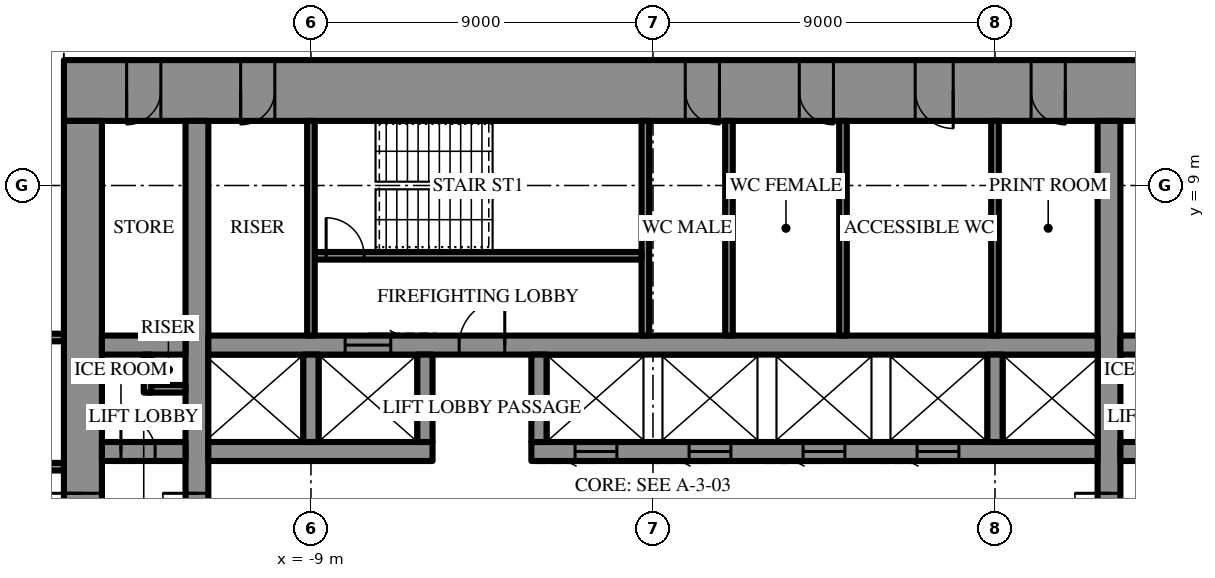
"""IFC4 building model, lengths in metres.
Left out: names, types, materials, properties, quantities, classifications, styles, units other than length and angle.
Written with IfcOpenShell. Run it as: python <this file> out.ifc"""

import sys

from ifc_helpers import new_model, si_unit, direction, frame, frame_2d, origin, place, context, subcontext, project, spatial, rectangle, extrude, element, fill, save


model = new_model("IFC4")
c1 = context("Model", 3, precision=1e-05, world=origin(), true_north=direction((0.0, 1.0)))
c2 = subcontext(c1, "Body", "Model", "MODEL_VIEW")
j1 = project(units=[si_unit("LENGTHUNIT", "METRE"), si_unit("PLANEANGLEUNIT", "RADIAN")], contexts=[c1])
p1 = place(None, origin())
s1 = spatial("IfcSite", under=j1, at=p1, CompositionType="ELEMENT")
p2 = place(p1, origin())
s2 = spatial("IfcBuilding", under=s1, at=p2, CompositionType="ELEMENT")
p3 = place(p2, frame((0.0, 0.0, 236.5)))
s3 = spatial("IfcBuildingStorey", under=s2, at=p3, CompositionType="ELEMENT", Elevation=236.5)
p4 = place(p3, frame((-15.5, 11.5, 0.0), z_axis=(0.0, 0.0, 1.0), x_axis=(1.0, 0.0, 0.0)))
e1 = element("IfcWall", 1, at=p4, inside=s3, PredefinedType="SHEAR", context=c2, shape_type="SweptSolid", body=[
    extrude(rectangle(XDim=31.0, YDim=1.6, at=frame_2d((15.5, 0.0))), origin(), (0.0, 0.0, 1.0), 4.2),
])
p5 = place(p4, frame((16.35, 0.0, 0.0)))
e2 = element("IfcOpeningElement", 2, at=p5, cuts=e1, PredefinedType="OPENING", context=c2, shape_type="SweptSolid", body=[
    extrude(rectangle(XDim=0.9, YDim=2.2, at=frame_2d((0.45, 1.1))), frame((0.0, 0.81, 0.0), z_axis=(0.0, -1.0, 0.0), x_axis=(1.0, 0.0, 0.0)), (0.0, 0.0, 1.0), 1.62),
])
p6 = place(p4, frame((19.35, 0.0, 0.0)))
e3 = element("IfcOpeningElement", 3, at=p6, cuts=e1, PredefinedType="OPENING", context=c2, shape_type="SweptSolid", body=[
    extrude(rectangle(XDim=0.9, YDim=2.2, at=frame_2d((0.45, 1.1))), frame((0.0, 0.81, 0.0), z_axis=(0.0, -1.0, 0.0), x_axis=(1.0, 0.0, 0.0)), (0.0, 0.0, 1.0), 1.62),
])
p7 = place(p4, frame((22.4, 0.0, 0.0)))
e4 = element("IfcOpeningElement", 4, at=p7, cuts=e1, PredefinedType="OPENING", context=c2, shape_type="SweptSolid", body=[
    extrude(rectangle(XDim=1.0, YDim=2.2, at=frame_2d((0.5, 1.1))), frame((0.0, 0.81, 0.0), z_axis=(0.0, -1.0, 0.0), x_axis=(1.0, 0.0, 0.0)), (0.0, 0.0, 1.0), 1.62),
])
p8 = place(p4, frame((1.65, 0.0, 0.0)))
e5 = element("IfcOpeningElement", 5, at=p8, cuts=e1, PredefinedType="OPENING", context=c2, shape_type="SweptSolid", body=[
    extrude(rectangle(XDim=0.9, YDim=2.2, at=frame_2d((0.45, 1.1))), frame((0.0, 0.81, 0.0), z_axis=(0.0, -1.0, 0.0), x_axis=(1.0, 0.0, 0.0)), (0.0, 0.0, 1.0), 1.62),
])
p9 = place(p4, frame((4.65, 0.0, 0.0)))
e6 = element("IfcOpeningElement", 6, at=p9, cuts=e1, PredefinedType="OPENING", context=c2, shape_type="SweptSolid", body=[
    extrude(rectangle(XDim=0.9, YDim=2.2, at=frame_2d((0.45, 1.1))), frame((0.0, 0.81, 0.0), z_axis=(0.0, -1.0, 0.0), x_axis=(1.0, 0.0, 0.0)), (0.0, 0.0, 1.0), 1.62),
])
p10 = place(p4, frame((25.45, 0.0, 0.0)))
e7 = element("IfcOpeningElement", 7, at=p10, cuts=e1, PredefinedType="OPENING", context=c2, shape_type="SweptSolid", body=[
    extrude(rectangle(XDim=0.9, YDim=2.2, at=frame_2d((0.45, 1.1))), frame((0.0, 0.81, 0.0), z_axis=(0.0, -1.0, 0.0), x_axis=(1.0, 0.0, 0.0)), (0.0, 0.0, 1.0), 1.62),
])
p11 = place(p4, frame((28.45, 0.0, 0.0)))
e8 = element("IfcOpeningElement", 8, at=p11, cuts=e1, PredefinedType="OPENING", context=c2, shape_type="SweptSolid", body=[
    extrude(rectangle(XDim=0.9, YDim=2.2, at=frame_2d((0.45, 1.1))), frame((0.0, 0.81, 0.0), z_axis=(0.0, -1.0, 0.0), x_axis=(1.0, 0.0, 0.0)), (0.0, 0.0, 1.0), 1.62),
])
p12 = place(p3, frame((-15.0, 10.7, 0.0), z_axis=(0.0, 0.0, 1.0), x_axis=(0.0, -1.0, 0.0)))
e9 = element("IfcWall", 9, at=p12, inside=s3, PredefinedType="SHEAR", context=c2, shape_type="SweptSolid", body=[
    extrude(rectangle(XDim=21.4, YDim=1.0, at=frame_2d((10.7, 0.0))), origin(), (0.0, 0.0, 1.0), 4.2),
])
p13 = place(p12, frame((9.8, 0.0, 0.0)))
e10 = element("IfcOpeningElement", 10, at=p13, cuts=e9, PredefinedType="OPENING", context=c2, shape_type="SweptSolid", body=[
    extrude(rectangle(XDim=1.8, YDim=2.4, at=frame_2d((0.9, 1.2))), frame((0.0, 0.51, 0.0), z_axis=(0.0, -1.0, 0.0), x_axis=(1.0, 0.0, 0.0)), (0.0, 0.0, 1.0), 1.02),
])
p14 = place(p3, frame((12.0, -10.7, 0.0), z_axis=(0.0, 0.0, 1.0), x_axis=(0.0, 1.0, 0.0)))
e11 = element("IfcWall", 11, at=p14, inside=s3, PredefinedType="SHEAR", context=c2, shape_type="SweptSolid", body=[
    extrude(rectangle(XDim=21.4, YDim=0.6, at=frame_2d((10.7, 0.0))), origin(), (0.0, 0.0, 1.0), 4.2),
])
p15 = place(p14, frame((9.8, 0.0, 0.0)))
e12 = element("IfcOpeningElement", 12, at=p15, cuts=e11, PredefinedType="OPENING", context=c2, shape_type="SweptSolid", body=[
    extrude(rectangle(XDim=1.8, YDim=2.4, at=frame_2d((0.9, 1.2))), frame((0.0, 0.31, 0.0), z_axis=(0.0, -1.0, 0.0), x_axis=(1.0, 0.0, 0.0)), (0.0, 0.0, 1.0), 0.62),
])
p16 = place(p3, frame((-12.0, -10.7, 0.0), z_axis=(0.0, 0.0, 1.0), x_axis=(0.0, 1.0, 0.0)))
e13 = element("IfcWall", 13, at=p16, inside=s3, PredefinedType="SHEAR", context=c2, shape_type="SweptSolid", body=[
    extrude(rectangle(XDim=21.4, YDim=0.6, at=frame_2d((10.7, 0.0))), origin(), (0.0, 0.0, 1.0), 4.2),
])
p17 = place(p16, frame((9.8, 0.0, 0.0)))
e14 = element("IfcOpeningElement", 14, at=p17, cuts=e13, PredefinedType="OPENING", context=c2, shape_type="SweptSolid", body=[
    extrude(rectangle(XDim=1.8, YDim=2.4, at=frame_2d((0.9, 1.2))), frame((0.0, 0.31, 0.0), z_axis=(0.0, -1.0, 0.0), x_axis=(1.0, 0.0, 0.0)), (0.0, 0.0, 1.0), 0.62),
])
p18 = place(p3, frame((-14.5, 2.0, 0.0), z_axis=(0.0, 0.0, 1.0), x_axis=(1.0, 0.0, 0.0)))
e15 = element("IfcWall", 15, at=p18, inside=s3, PredefinedType="SHEAR", context=c2, shape_type="SweptSolid", body=[
    extrude(rectangle(XDim=2.2, YDim=0.5, at=frame_2d((1.1, 0.0))), origin(), (0.0, 0.0, 1.0), 4.2),
])
p19 = place(p18, frame((0.5, 0.0, 0.0)))
e16 = element("IfcOpeningElement", 16, at=p19, cuts=e15, PredefinedType="OPENING", context=c2, shape_type="SweptSolid", body=[
    extrude(rectangle(XDim=0.9, YDim=2.2, at=frame_2d((0.45, 1.1))), frame((0.0, 0.26, 0.0), z_axis=(0.0, -1.0, 0.0), x_axis=(1.0, 0.0, 0.0)), (0.0, 0.0, 1.0), 0.52),
])
p20 = place(p3, frame((-11.7, 2.0, 0.0), z_axis=(0.0, 0.0, 1.0), x_axis=(1.0, 0.0, 0.0)))
e17 = element("IfcWall", 17, at=p20, inside=s3, PredefinedType="SHEAR", context=c2, shape_type="SweptSolid", body=[
    extrude(rectangle(XDim=5.9, YDim=0.5, at=frame_2d((2.95, 0.0))), origin(), (0.0, 0.0, 1.0), 4.2),
])
p21 = place(p3, frame((-3.2, 2.0, 0.0), z_axis=(0.0, 0.0, 1.0), x_axis=(1.0, 0.0, 0.0)))
e18 = element("IfcWall", 18, at=p21, inside=s3, PredefinedType="SHEAR", context=c2, shape_type="SweptSolid", body=[
    extrude(rectangle(XDim=14.9, YDim=0.5, at=frame_2d((7.45, 0.0))), origin(), (0.0, 0.0, 1.0), 4.2),
])
p22 = place(p21, frame((1.15, 0.0, 0.0)))
e19 = element("IfcOpeningElement", 19, at=p22, cuts=e18, PredefinedType="OPENING", context=c2, shape_type="SweptSolid", body=[
    extrude(rectangle(XDim=1.1, YDim=2.2, at=frame_2d((0.55, 1.1))), frame((0.0, 0.26, 0.0), z_axis=(0.0, -1.0, 0.0), x_axis=(1.0, 0.0, 0.0)), (0.0, 0.0, 1.0), 0.52),
])
p23 = place(p21, frame((4.15, 0.0, 0.0)))
e20 = element("IfcOpeningElement", 20, at=p23, cuts=e18, PredefinedType="OPENING", context=c2, shape_type="SweptSolid", body=[
    extrude(rectangle(XDim=1.1, YDim=2.2, at=frame_2d((0.55, 1.1))), frame((0.0, 0.26, 0.0), z_axis=(0.0, -1.0, 0.0), x_axis=(1.0, 0.0, 0.0)), (0.0, 0.0, 1.0), 0.52),
])
p24 = place(p21, frame((7.15, 0.0, 0.0)))
e21 = element("IfcOpeningElement", 21, at=p24, cuts=e18, PredefinedType="OPENING", context=c2, shape_type="SweptSolid", body=[
    extrude(rectangle(XDim=1.1, YDim=2.2, at=frame_2d((0.55, 1.1))), frame((0.0, 0.26, 0.0), z_axis=(0.0, -1.0, 0.0), x_axis=(1.0, 0.0, 0.0)), (0.0, 0.0, 1.0), 0.52),
])
p25 = place(p21, frame((10.15, 0.0, 0.0)))
e22 = element("IfcOpeningElement", 22, at=p25, cuts=e18, PredefinedType="OPENING", context=c2, shape_type="SweptSolid", body=[
    extrude(rectangle(XDim=1.1, YDim=2.2, at=frame_2d((0.55, 1.1))), frame((0.0, 0.26, 0.0), z_axis=(0.0, -1.0, 0.0), x_axis=(1.0, 0.0, 0.0)), (0.0, 0.0, 1.0), 0.52),
])
p26 = place(p3, frame((12.3, 2.0, 0.0), z_axis=(0.0, 0.0, 1.0), x_axis=(1.0, 0.0, 0.0)))
e23 = element("IfcWall", 23, at=p26, inside=s3, PredefinedType="SHEAR", context=c2, shape_type="SweptSolid", body=[
    extrude(rectangle(XDim=2.2, YDim=0.5, at=frame_2d((1.1, 0.0))), origin(), (0.0, 0.0, 1.0), 4.2),
])
p27 = place(p26, frame((0.8, 0.0, 0.0)))
e24 = element("IfcOpeningElement", 24, at=p27, cuts=e23, PredefinedType="OPENING", context=c2, shape_type="SweptSolid", body=[
    extrude(rectangle(XDim=0.9, YDim=2.2, at=frame_2d((0.45, 1.1))), frame((0.0, 0.26, 0.0), z_axis=(0.0, -1.0, 0.0), x_axis=(1.0, 0.0, 0.0)), (0.0, 0.0, 1.0), 0.52),
])
p28 = place(p3, frame((-14.5, 4.8, 0.0), z_axis=(0.0, 0.0, 1.0), x_axis=(1.0, 0.0, 0.0)))
e25 = element("IfcWall", 25, at=p28, inside=s3, PredefinedType="SHEAR", context=c2, shape_type="SweptSolid", body=[
    extrude(rectangle(XDim=2.2, YDim=0.5, at=frame_2d((1.1, 0.0))), origin(), (0.0, 0.0, 1.0), 4.2),
])
p29 = place(p3, frame((-11.7, 4.8, 0.0), z_axis=(0.0, 0.0, 1.0), x_axis=(1.0, 0.0, 0.0)))
e26 = element("IfcWall", 26, at=p29, inside=s3, PredefinedType="SHEAR", context=c2, shape_type="SweptSolid", body=[
    extrude(rectangle(XDim=23.4, YDim=0.5, at=frame_2d((11.7, 0.0))), origin(), (0.0, 0.0, 1.0), 4.2),
])
p30 = place(p29, frame((6.6, 0.0, 0.0)))
e27 = element("IfcOpeningElement", 27, at=p30, cuts=e26, PredefinedType="OPENING", context=c2, shape_type="SweptSolid", body=[
    extrude(rectangle(XDim=1.2, YDim=2.2, at=frame_2d((0.6, 1.1))), frame((0.0, 0.26, 0.0), z_axis=(0.0, -1.0, 0.0), x_axis=(1.0, 0.0, 0.0)), (0.0, 0.0, 1.0), 0.52),
])
p31 = place(p29, frame((3.6, 0.0, 0.0)))
e28 = element("IfcOpeningElement", 28, at=p31, cuts=e26, PredefinedType="OPENING", context=c2, shape_type="SweptSolid", body=[
    extrude(rectangle(XDim=1.2, YDim=2.2, at=frame_2d((0.6, 1.1))), frame((0.0, 0.26, 0.0), z_axis=(0.0, -1.0, 0.0), x_axis=(1.0, 0.0, 0.0)), (0.0, 0.0, 1.0), 0.52),
])
p32 = place(p3, frame((12.3, 4.8, 0.0), z_axis=(0.0, 0.0, 1.0), x_axis=(1.0, 0.0, 0.0)))
e29 = element("IfcWall", 29, at=p32, inside=s3, PredefinedType="SHEAR", context=c2, shape_type="SweptSolid", body=[
    extrude(rectangle(XDim=2.2, YDim=0.5, at=frame_2d((1.1, 0.0))), origin(), (0.0, 0.0, 1.0), 4.2),
])
for number, where, z_axis, x_axis in (
    (30, (-9.0, 2.25, 0.0), (0.0, 0.0, 1.0), (0.0, 1.0, 0.0)),
    (31, (-6.0, 2.25, 0.0), (0.0, 0.0, 1.0), (0.0, 1.0, 0.0)),
    (32, (-3.0, 2.25, 0.0), (0.0, 0.0, 1.0), (0.0, 1.0, 0.0)),
    (33, (9.0, 2.25, 0.0), (0.0, 0.0, 1.0), (0.0, 1.0, 0.0)),
):
    element("IfcWall", number, at=place(p3, frame(where, z_axis=z_axis, x_axis=x_axis)), inside=s3, PredefinedType="SHEAR", context=c2, shape_type="SweptSolid", body=[
        extrude(rectangle(XDim=2.3, YDim=0.4, at=frame_2d((1.15, 0.0))), origin(), (0.0, 0.0, 1.0), 4.2),
    ])
p33 = place(p3, frame((-0.2, 5.05, 0.0), z_axis=(0.0, 0.0, 1.0), x_axis=(0.0, 1.0, 0.0)))
e34 = element("IfcWall", 34, at=p33, inside=s3, PredefinedType="SHEAR", context=c2, shape_type="SweptSolid", body=[
    extrude(rectangle(XDim=5.65, YDim=0.2, at=frame_2d((2.825, 0.0))), origin(), (0.0, 0.0, 1.0), 4.2),
])
p34 = place(p3, frame((-8.9, 7.15, 0.0), z_axis=(0.0, 0.0, 1.0), x_axis=(1.0, 0.0, 0.0)))
e35 = element("IfcWall", 35, at=p34, inside=s3, PredefinedType="SHEAR", context=c2, shape_type="SweptSolid", body=[
    extrude(rectangle(XDim=8.6, YDim=0.2, at=frame_2d((4.3, 0.0))), origin(), (0.0, 0.0, 1.0), 4.2),
])
p35 = place(p34, frame((0.3, 0.0, 0.0)))
e36 = element("IfcOpeningElement", 36, at=p35, cuts=e35, PredefinedType="OPENING", context=c2, shape_type="SweptSolid", body=[
    extrude(rectangle(XDim=1.0, YDim=2.2, at=frame_2d((0.5, 1.1))), frame((0.0, 0.11, 0.0), z_axis=(0.0, -1.0, 0.0), x_axis=(1.0, 0.0, 0.0)), (0.0, 0.0, 1.0), 0.22),
])
for number, where, z_axis, x_axis in (
    (37, (-9.0, 5.05, 0.0), (0.0, 0.0, 1.0), (0.0, 1.0, 0.0)),
    (38, (9.0, 5.05, 0.0), (0.0, 0.0, 1.0), (0.0, 1.0, 0.0)),
    (39, (2.0, 5.05, 0.0), (0.0, 0.0, 1.0), (0.0, 1.0, 0.0)),
    (40, (5.0, 5.05, 0.0), (0.0, 0.0, 1.0), (0.0, 1.0, 0.0)),
):
    element("IfcWall", number, at=place(p3, frame(where, z_axis=z_axis, x_axis=x_axis)), inside=s3, PredefinedType="PARTITIONING", context=c2, shape_type="SweptSolid", body=[
        extrude(rectangle(XDim=5.65, YDim=0.2, at=frame_2d((2.825, 0.0))), origin(), (0.0, 0.0, 1.0), 4.0),
    ])
for number, where, z_axis, x_axis in (
    (41, (-13.3, 3.65, 0.0), (0.0, 0.0, 1.0), (1.0, 0.0, 0.0)),
    (42, (-13.3, 3.55, 0.0), (0.0, 0.0, 1.0), (0.0, 1.0, 0.0)),
):
    element("IfcWall", number, at=place(p3, frame(where, z_axis=z_axis, x_axis=x_axis)), inside=s3, PredefinedType="PARTITIONING", context=c2, shape_type="SweptSolid", body=[
        extrude(rectangle(XDim=1.0, YDim=0.2, at=frame_2d((0.5, 0.0))), origin(), (0.0, 0.0, 1.0), 4.0),
    ])
p36 = place(p3, frame((-15.5, 1.6, 0.0), z_axis=(0.0, 0.0, 1.0), x_axis=(-1.0, 0.0, 0.0)))
e43 = element("IfcWall", 43, at=p36, inside=s3, PredefinedType="PARTITIONING", context=c2, shape_type="SweptSolid", body=[
    extrude(rectangle(XDim=9.7, YDim=0.2, at=frame_2d((4.85, 0.0))), origin(), (0.0, 0.0, 1.0), 4.0),
])
p37 = place(p36, frame((6.29, 0.0, 0.0)))
e44 = element("IfcOpeningElement", 44, at=p37, cuts=e43, PredefinedType="OPENING", context=c2, shape_type="SweptSolid", body=[
    extrude(rectangle(XDim=1.0, YDim=2.2, at=frame_2d((0.5, 1.1))), frame((0.0, 0.11, 0.0), z_axis=(0.0, -1.0, 0.0), x_axis=(1.0, 0.0, 0.0)), (0.0, 0.0, 1.0), 0.22),
])
p38 = place(p3, frame((-15.5, 5.0, 0.0), z_axis=(0.0, 0.0, 1.0), x_axis=(-1.0, 0.0, 0.0)))
e45 = element("IfcWall", 45, at=p38, inside=s3, PredefinedType="PARTITIONING", context=c2, shape_type="SweptSolid", body=[
    extrude(rectangle(XDim=14.845, YDim=0.2, at=frame_2d((7.423, 0.0))), origin(), (0.0, 0.0, 1.0), 4.0),
])
p39 = place(p13, frame((1.8, 0.0, 0.0), z_axis=(0.0, 0.0, 1.0), x_axis=(-1.0, 0.0, 0.0)))
e46 = element("IfcDoor", 46, at=p39, inside=s3, OperationType="DOUBLE_DOOR_SINGLE_SWING", PredefinedType="DOOR", context=c2, shape_type="SweptSolid", body=[
    extrude(rectangle(XDim=1.8, YDim=2.4, at=frame_2d((0.9, 1.2))), frame((0.0, 0.025, 0.0), z_axis=(0.0, -1.0, 0.0), x_axis=(1.0, 0.0, 0.0)), (0.0, 0.0, 1.0), 0.05),
])
fill(e10, e46)
p40 = place(p30, origin())
e47 = element("IfcDoor", 47, at=p40, inside=s3, OperationType="SINGLE_SWING_LEFT", PredefinedType="DOOR", context=c2, shape_type="SweptSolid", body=[
    extrude(rectangle(XDim=1.2, YDim=2.2, at=frame_2d((0.6, 1.1))), frame((0.0, 0.025, 0.0), z_axis=(0.0, -1.0, 0.0), x_axis=(1.0, 0.0, 0.0)), (0.0, 0.0, 1.0), 0.05),
])
fill(e27, e47)
p41 = place(p35, origin())
e48 = element("IfcDoor", 48, at=p41, inside=s3, OperationType="SINGLE_SWING_RIGHT", PredefinedType="DOOR", context=c2, shape_type="SweptSolid", body=[
    extrude(rectangle(XDim=1.0, YDim=2.2, at=frame_2d((0.5, 1.1))), frame((0.0, 0.025, 0.0), z_axis=(0.0, -1.0, 0.0), x_axis=(1.0, 0.0, 0.0)), (0.0, 0.0, 1.0), 0.05),
])
fill(e36, e48)
p42 = place(p5, frame((0.9, 0.0, 0.0), z_axis=(0.0, 0.0, 1.0), x_axis=(-1.0, 0.0, 0.0)))
e49 = element("IfcDoor", 49, at=p42, inside=s3, OperationType="SINGLE_SWING_RIGHT", PredefinedType="DOOR", context=c2, shape_type="SweptSolid", body=[
    extrude(rectangle(XDim=0.9, YDim=2.2, at=frame_2d((0.45, 1.1))), frame((0.0, 0.025, 0.0), z_axis=(0.0, -1.0, 0.0), x_axis=(1.0, 0.0, 0.0)), (0.0, 0.0, 1.0), 0.05),
])
fill(e2, e49)
p43 = place(p6, frame((0.9, 0.0, 0.0), z_axis=(0.0, 0.0, 1.0), x_axis=(-1.0, 0.0, 0.0)))
e50 = element("IfcDoor", 50, at=p43, inside=s3, OperationType="SINGLE_SWING_RIGHT", PredefinedType="DOOR", context=c2, shape_type="SweptSolid", body=[
    extrude(rectangle(XDim=0.9, YDim=2.2, at=frame_2d((0.45, 1.1))), frame((0.0, 0.025, 0.0), z_axis=(0.0, -1.0, 0.0), x_axis=(1.0, 0.0, 0.0)), (0.0, 0.0, 1.0), 0.05),
])
fill(e3, e50)
p44 = place(p7, frame((1.0, 0.0, 0.0), z_axis=(0.0, 0.0, 1.0), x_axis=(-1.0, 0.0, 0.0)))
e51 = element("IfcDoor", 51, at=p44, inside=s3, OperationType="SINGLE_SWING_RIGHT", PredefinedType="DOOR", context=c2, shape_type="SweptSolid", body=[
    extrude(rectangle(XDim=1.0, YDim=2.2, at=frame_2d((0.5, 1.1))), frame((0.0, 0.025, 0.0), z_axis=(0.0, -1.0, 0.0), x_axis=(1.0, 0.0, 0.0)), (0.0, 0.0, 1.0), 0.05),
])
fill(e4, e51)
p45 = place(p8, frame((0.9, 0.0, 0.0), z_axis=(0.0, 0.0, 1.0), x_axis=(-1.0, 0.0, 0.0)))
e52 = element("IfcDoor", 52, at=p45, inside=s3, OperationType="SINGLE_SWING_LEFT", PredefinedType="DOOR", context=c2, shape_type="SweptSolid", body=[
    extrude(rectangle(XDim=0.9, YDim=2.2, at=frame_2d((0.45, 1.1))), frame((0.0, 0.025, 0.0), z_axis=(0.0, -1.0, 0.0), x_axis=(1.0, 0.0, 0.0)), (0.0, 0.0, 1.0), 0.05),
])
fill(e5, e52)
p46 = place(p9, frame((0.9, 0.0, 0.0), z_axis=(0.0, 0.0, 1.0), x_axis=(-1.0, 0.0, 0.0)))
e53 = element("IfcDoor", 53, at=p46, inside=s3, OperationType="SINGLE_SWING_LEFT", PredefinedType="DOOR", context=c2, shape_type="SweptSolid", body=[
    extrude(rectangle(XDim=0.9, YDim=2.2, at=frame_2d((0.45, 1.1))), frame((0.0, 0.025, 0.0), z_axis=(0.0, -1.0, 0.0), x_axis=(1.0, 0.0, 0.0)), (0.0, 0.0, 1.0), 0.05),
])
fill(e6, e53)
p47 = place(p10, frame((0.9, 0.0, 0.0), z_axis=(0.0, 0.0, 1.0), x_axis=(-1.0, 0.0, 0.0)))
e54 = element("IfcDoor", 54, at=p47, inside=s3, OperationType="SINGLE_SWING_RIGHT", PredefinedType="DOOR", context=c2, shape_type="SweptSolid", body=[
    extrude(rectangle(XDim=0.9, YDim=2.2, at=frame_2d((0.45, 1.1))), frame((0.0, 0.025, 0.0), z_axis=(0.0, -1.0, 0.0), x_axis=(1.0, 0.0, 0.0)), (0.0, 0.0, 1.0), 0.05),
])
fill(e7, e54)
p48 = place(p19, origin())
e55 = element("IfcDoor", 55, at=p48, inside=s3, OperationType="SINGLE_SWING_RIGHT", PredefinedType="DOOR", context=c2, shape_type="SweptSolid", body=[
    extrude(rectangle(XDim=0.9, YDim=2.2, at=frame_2d((0.45, 1.1))), frame((0.0, 0.025, 0.0), z_axis=(0.0, -1.0, 0.0), x_axis=(1.0, 0.0, 0.0)), (0.0, 0.0, 1.0), 0.05),
])
fill(e16, e55)
p49 = place(p15, origin())
e56 = element("IfcDoor", 56, at=p49, inside=s3, OperationType="DOUBLE_DOOR_SINGLE_SWING", PredefinedType="DOOR", context=c2, shape_type="SweptSolid", body=[
    extrude(rectangle(XDim=1.8, YDim=2.4, at=frame_2d((0.9, 1.2))), frame((0.0, 0.025, 0.0), z_axis=(0.0, -1.0, 0.0), x_axis=(1.0, 0.0, 0.0)), (0.0, 0.0, 1.0), 0.05),
])
fill(e12, e56)
p50 = place(p17, origin())
e57 = element("IfcDoor", 57, at=p50, inside=s3, OperationType="DOUBLE_DOOR_SINGLE_SWING", PredefinedType="DOOR", context=c2, shape_type="SweptSolid", body=[
    extrude(rectangle(XDim=1.8, YDim=2.4, at=frame_2d((0.9, 1.2))), frame((0.0, 0.025, 0.0), z_axis=(0.0, -1.0, 0.0), x_axis=(1.0, 0.0, 0.0)), (0.0, 0.0, 1.0), 0.05),
])
fill(e14, e57)
p51 = place(p31, origin())
e58 = element("IfcDoor", 58, at=p51, inside=s3, OperationType="SLIDING_TO_LEFT", PredefinedType="DOOR", context=c2, shape_type="SweptSolid", body=[
    extrude(rectangle(XDim=1.2, YDim=2.2, at=frame_2d((0.6, 1.1))), frame((0.0, 0.025, 0.0), z_axis=(0.0, -1.0, 0.0), x_axis=(1.0, 0.0, 0.0)), (0.0, 0.0, 1.0), 0.05),
])
fill(e28, e58)
p52 = place(p22, frame((1.1, 0.0, 0.0), z_axis=(0.0, 0.0, 1.0), x_axis=(-1.0, 0.0, 0.0)))
e59 = element("IfcDoor", 59, at=p52, inside=s3, OperationType="SLIDING_TO_LEFT", PredefinedType="DOOR", context=c2, shape_type="SweptSolid", body=[
    extrude(rectangle(XDim=1.1, YDim=2.2, at=frame_2d((0.55, 1.1))), frame((0.0, 0.025, 0.0), z_axis=(0.0, -1.0, 0.0), x_axis=(1.0, 0.0, 0.0)), (0.0, 0.0, 1.0), 0.05),
])
fill(e19, e59)
p53 = place(p23, frame((1.1, 0.0, 0.0), z_axis=(0.0, 0.0, 1.0), x_axis=(-1.0, 0.0, 0.0)))
e60 = element("IfcDoor", 60, at=p53, inside=s3, OperationType="SLIDING_TO_LEFT", PredefinedType="DOOR", context=c2, shape_type="SweptSolid", body=[
    extrude(rectangle(XDim=1.1, YDim=2.2, at=frame_2d((0.55, 1.1))), frame((0.0, 0.025, 0.0), z_axis=(0.0, -1.0, 0.0), x_axis=(1.0, 0.0, 0.0)), (0.0, 0.0, 1.0), 0.05),
])
fill(e20, e60)
p54 = place(p24, frame((1.1, 0.0, 0.0), z_axis=(0.0, 0.0, 1.0), x_axis=(-1.0, 0.0, 0.0)))
e61 = element("IfcDoor", 61, at=p54, inside=s3, OperationType="SLIDING_TO_LEFT", PredefinedType="DOOR", context=c2, shape_type="SweptSolid", body=[
    extrude(rectangle(XDim=1.1, YDim=2.2, at=frame_2d((0.55, 1.1))), frame((0.0, 0.025, 0.0), z_axis=(0.0, -1.0, 0.0), x_axis=(1.0, 0.0, 0.0)), (0.0, 0.0, 1.0), 0.05),
])
fill(e21, e61)
p55 = place(p25, frame((1.1, 0.0, 0.0), z_axis=(0.0, 0.0, 1.0), x_axis=(-1.0, 0.0, 0.0)))
e62 = element("IfcDoor", 62, at=p55, inside=s3, OperationType="SLIDING_TO_LEFT", PredefinedType="DOOR", context=c2, shape_type="SweptSolid", body=[
    extrude(rectangle(XDim=1.1, YDim=2.2, at=frame_2d((0.55, 1.1))), frame((0.0, 0.025, 0.0), z_axis=(0.0, -1.0, 0.0), x_axis=(1.0, 0.0, 0.0)), (0.0, 0.0, 1.0), 0.05),
])
fill(e22, e62)
save(model, sys.argv[1])
